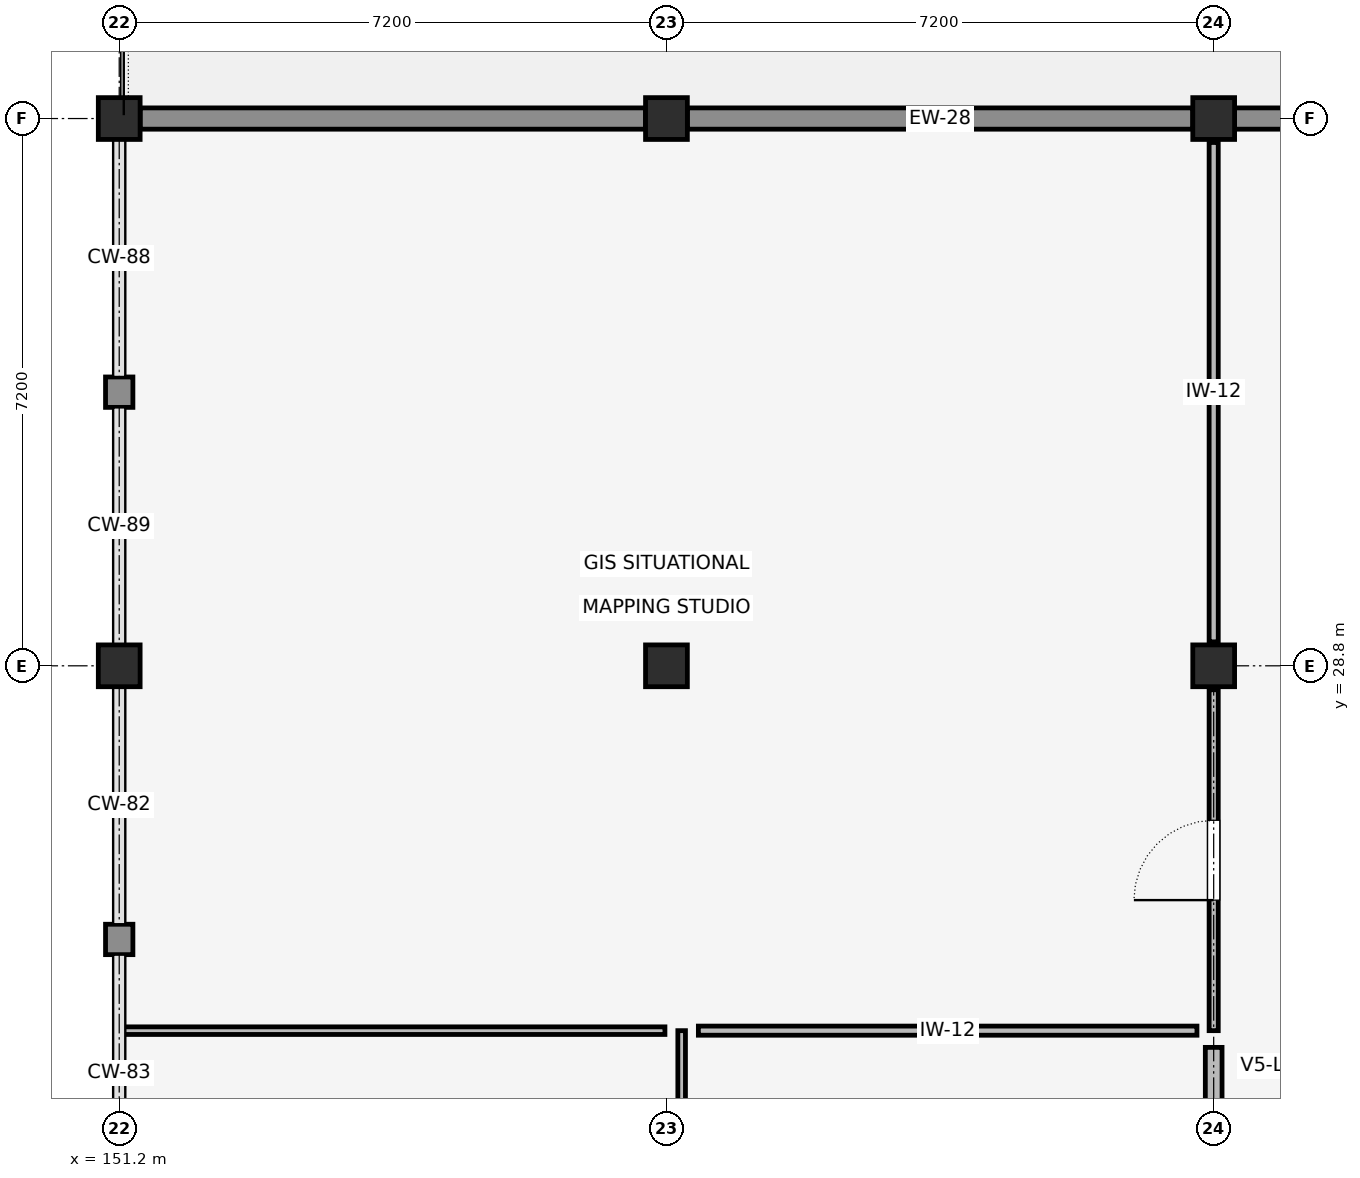
"""IFC4 building model, lengths in metres.
Left out: names, types, materials, properties, quantities, classifications, styles, units other than length and angle.
Written with IfcOpenShell. Run it as: python <this file> out.ifc"""

import sys

from ifc_helpers import new_model, si_unit, direction, frame, frame_2d, origin, origin_2d, place, context, subcontext, project, spatial, rectangle, extrude, element, fill, save


model = new_model("IFC4")
c1 = context("Model", 3, precision=1e-05, world=origin(), true_north=direction((0.0, 1.0)))
c2 = subcontext(c1, "Body", "Model", "MODEL_VIEW")
j1 = project(units=[si_unit("LENGTHUNIT", "METRE"), si_unit("PLANEANGLEUNIT", "RADIAN")], contexts=[c1])
p1 = place(None, origin())
s1 = spatial("IfcSite", under=j1, at=p1, CompositionType="ELEMENT")
p2 = place(p1, origin())
s2 = spatial("IfcBuilding", under=s1, at=p2, CompositionType="ELEMENT")
p3 = place(p2, frame((0.0, 0.0, 17.4)))
s3 = spatial("IfcBuildingStorey", under=s2, at=p3, CompositionType="ELEMENT", Elevation=17.4)
for number, where, z_axis, x_axis in (
    (1, (151.2, 28.8, 0.0), (0.0, 0.0, 1.0), (1.0, 0.0, 0.0)),
    (2, (151.2, 36.0, 0.0), (0.0, 0.0, 1.0), (1.0, 0.0, 0.0)),
    (3, (158.4, 28.8, 0.0), (0.0, 0.0, 1.0), (1.0, 0.0, 0.0)),
    (4, (158.4, 36.0, 0.0), (0.0, 0.0, 1.0), (1.0, 0.0, 0.0)),
    (5, (165.6, 28.8, 0.0), (0.0, 0.0, 1.0), (1.0, 0.0, 0.0)),
    (6, (165.6, 36.0, 0.0), (0.0, 0.0, 1.0), (1.0, 0.0, 0.0)),
):
    element("IfcColumn", number, at=place(p3, frame(where, z_axis=z_axis, x_axis=x_axis)), inside=s3, PredefinedType="COLUMN", context=c2, shape_type="SweptSolid", body=[
        extrude(rectangle(XDim=0.55, YDim=0.55, at=origin_2d()), origin(), (0.0, 0.0, 1.0), 3.9),
    ])
p4 = place(p3, frame((172.525, 36.0, 0.0), z_axis=(0.0, 0.0, 1.0), x_axis=(-1.0, 0.0, 0.0)))
e7 = element("IfcWall", 7, at=p4, inside=s3, PredefinedType="ELEMENTEDWALL", context=c2, shape_type="SweptSolid", body=[
    extrude(rectangle(XDim=6.65, YDim=0.28, at=frame_2d((3.325, 0.0))), origin(), (0.0, 0.0, 1.0), 2.9),
])
p5 = place(p4, frame((4.903, 0.0, 0.0)))
e8 = element("IfcOpeningElement", 8, at=p5, cuts=e7, PredefinedType="OPENING", context=c2, shape_type="SweptSolid", body=[
    extrude(rectangle(XDim=1.1, YDim=2.15, at=frame_2d((0.55, 1.075))), frame((0.0, 0.152, 0.0), z_axis=(0.0, -1.0, 0.0), x_axis=(1.0, 0.0, 0.0)), (0.0, 0.0, 1.0), 0.304),
])
p6 = place(p3, frame((165.325, 36.0, 0.0), z_axis=(0.0, 0.0, 1.0), x_axis=(-1.0, 0.0, 0.0)))
e9 = element("IfcWall", 9, at=p6, inside=s3, PredefinedType="ELEMENTEDWALL", context=c2, shape_type="SweptSolid", body=[
    extrude(rectangle(XDim=6.65, YDim=0.28, at=frame_2d((3.325, 0.0))), origin(), (0.0, 0.0, 1.0), 2.95),
])
p7 = place(p3, frame((158.125, 36.0, 0.0), z_axis=(0.0, 0.0, 1.0), x_axis=(-1.0, 0.0, 0.0)))
e10 = element("IfcWall", 10, at=p7, inside=s3, PredefinedType="ELEMENTEDWALL", context=c2, shape_type="SweptSolid", body=[
    extrude(rectangle(XDim=6.65, YDim=0.28, at=frame_2d((3.325, 0.0))), origin(), (0.0, 0.0, 1.0), 2.9),
])
p8 = place(p3, frame((151.2, 32.6, 0.0), z_axis=(0.0, 0.0, 1.0), x_axis=(0.0, -1.0, 0.0)))
e11 = element("IfcWall", 11, at=p8, inside=s3, PredefinedType="SOLIDWALL", context=c2, shape_type="SweptSolid", body=[
    extrude(rectangle(XDim=0.4, YDim=0.36, at=frame_2d((0.2, 0.0))), origin(), (0.0, 0.0, 1.0), 3.05),
])
p9 = place(p3, frame((151.2, 25.4, 0.0), z_axis=(0.0, 0.0, 1.0), x_axis=(0.0, -1.0, 0.0)))
e12 = element("IfcWall", 12, at=p9, inside=s3, PredefinedType="SOLIDWALL", context=c2, shape_type="SweptSolid", body=[
    extrude(rectangle(XDim=0.4, YDim=0.36, at=frame_2d((0.2, 0.0))), origin(), (0.0, 0.0, 1.0), 2.96),
])
p10 = place(p3, frame((158.6, 21.915, 0.0), z_axis=(0.0, 0.0, 1.0), x_axis=(0.0, 1.0, 0.0)))
e13 = element("IfcWall", 13, at=p10, inside=s3, PredefinedType="PARTITIONING", context=c2, shape_type="SweptSolid", body=[
    extrude(rectangle(XDim=2.085, YDim=0.1, at=frame_2d((1.042, 0.0))), origin(), (0.0, 0.0, 1.0), 3.008),
])
p11 = place(p3, frame((151.2, 24.0, 0.0), z_axis=(0.0, 0.0, 1.0), x_axis=(1.0, 0.0, 0.0)))
e14 = element("IfcWall", 14, at=p11, inside=s3, PredefinedType="PARTITIONING", context=c2, shape_type="SweptSolid", body=[
    extrude(rectangle(XDim=7.18, YDim=0.1, at=frame_2d((3.59, 0.0))), origin(), (0.0, 0.0, 1.0), 2.958),
])
p12 = place(p3, frame((165.6, 24.0, 0.0), z_axis=(0.0, 0.0, 1.0), x_axis=(0.0, 1.0, 0.0)))
e15 = element("IfcWall", 15, at=p12, inside=s3, PredefinedType="PARTITIONING", context=c2, shape_type="SweptSolid", body=[
    extrude(rectangle(XDim=4.485, YDim=0.12, at=frame_2d((2.243, 0.0))), origin(), (0.0, 0.0, 1.0), 2.958),
])
p13 = place(p12, frame((1.718, 0.0, 0.0)))
e16 = element("IfcOpeningElement", 16, at=p13, cuts=e15, PredefinedType="OPENING", context=c2, shape_type="SweptSolid", body=[
    extrude(rectangle(XDim=1.05, YDim=2.15, at=frame_2d((0.525, 1.075))), frame((0.0, 0.072, 0.0), z_axis=(0.0, -1.0, 0.0), x_axis=(1.0, 0.0, 0.0)), (0.0, 0.0, 1.0), 0.144),
])
p14 = place(p3, frame((165.6, 29.115, 0.0), z_axis=(0.0, 0.0, 1.0), x_axis=(0.0, 1.0, 0.0)))
e17 = element("IfcWall", 17, at=p14, inside=s3, PredefinedType="PARTITIONING", context=c2, shape_type="SweptSolid", body=[
    extrude(rectangle(XDim=6.57, YDim=0.12, at=frame_2d((3.285, 0.0))), origin(), (0.0, 0.0, 1.0), 3.048),
])
p15 = place(p3, frame((158.82, 24.0, 0.0), z_axis=(0.0, 0.0, 1.0), x_axis=(1.0, 0.0, 0.0)))
e18 = element("IfcWall", 18, at=p15, inside=s3, PredefinedType="PARTITIONING", context=c2, shape_type="SweptSolid", body=[
    extrude(rectangle(XDim=6.56, YDim=0.12, at=frame_2d((3.28, 0.0))), origin(), (0.0, 0.0, 1.0), 3.058),
])
p16 = place(p3, frame((165.6, 21.915, 0.0), z_axis=(0.0, 0.0, 1.0), x_axis=(0.0, 1.0, 0.0)))
e19 = element("IfcWall", 19, at=p16, inside=s3, PredefinedType="STANDARD", context=c2, shape_type="SweptSolid", body=[
    extrude(rectangle(XDim=1.865, YDim=0.22, at=frame_2d((0.933, 0.0))), origin(), (0.0, 0.0, 1.0), 2.958),
])
p17 = place(p13, origin())
e20 = element("IfcDoor", 20, at=p17, inside=s3, OperationType="SINGLE_SWING_LEFT", PredefinedType="DOOR", context=c2, shape_type="SweptSolid", body=[
    extrude(rectangle(XDim=1.05, YDim=2.15, at=frame_2d((0.525, 1.075))), frame((0.0, 0.025, 0.0), z_axis=(0.0, -1.0, 0.0), x_axis=(1.0, 0.0, 0.0)), (0.0, 0.0, 1.0), 0.05),
])
fill(e16, e20)
save(model, sys.argv[1])
